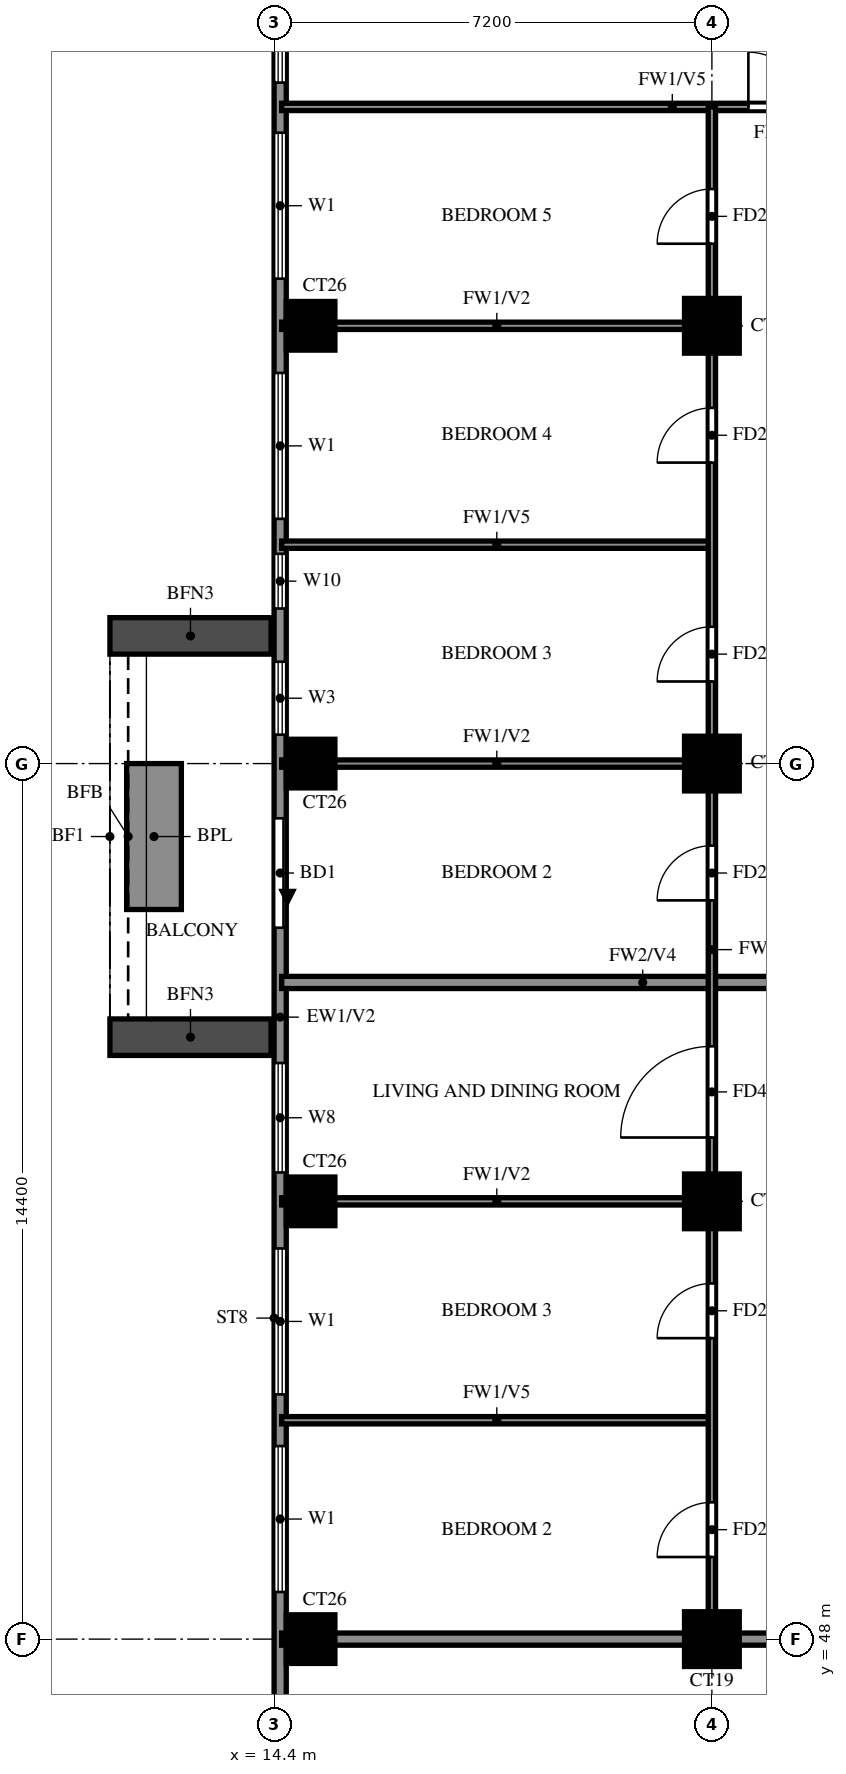
"""IFC4 building model, lengths in metres.
Left out: names, types, materials, properties, quantities, classifications, styles, units other than length and angle.
Written with IfcOpenShell. Run it as: python <this file> out.ifc"""

import sys

from ifc_helpers import new_model, si_unit, direction, frame, frame_2d, origin, origin_2d, place, context, subcontext, project, spatial, rectangle, extrude, source, transform, mapped, element, fill, save


model = new_model("IFC4")
c1 = context("Model", 3, precision=1e-05, world=origin(), true_north=direction((0.0, 1.0)))
c2 = subcontext(c1, "Body", "Model", "MODEL_VIEW")
j1 = project(units=[si_unit("LENGTHUNIT", "METRE"), si_unit("PLANEANGLEUNIT", "RADIAN")], contexts=[c1])
p1 = place(None, origin())
s1 = spatial("IfcSite", under=j1, at=p1, CompositionType="ELEMENT")
p2 = place(p1, origin())
s2 = spatial("IfcBuilding", under=s1, at=p2, CompositionType="ELEMENT")
p3 = place(p2, frame((0.0, 0.0, 188.5)))
s3 = spatial("IfcBuildingStorey", under=s2, at=p3, CompositionType="ELEMENT", Elevation=188.5)
m1 = source(origin(), c2, "Body", "SweptSolid", [
    extrude(rectangle(XDim=0.8, YDim=0.8, at=origin_2d()), origin(), (0.0, 0.0, 1.0), 3.2),
])
p4 = place(p3, frame((15.0, 48.0, 0.0), z_axis=(0.0, 0.0, 1.0), x_axis=(1.0, 0.0, 0.0)))
e1 = element("IfcColumn", 1, at=p4, inside=s3, PredefinedType="COLUMN", context=c2, shape_type="MappedRepresentation", body=[
    mapped(m1, transform((0.0, 0.0, 0.0))),
])
m2 = source(origin(), c2, "Body", "SweptSolid", [
    extrude(rectangle(XDim=0.9, YDim=0.9, at=origin_2d()), origin(), (0.0, 0.0, 1.0), 3.2),
])
p5 = place(p3, frame((21.6, 48.0, 0.0), z_axis=(0.0, 0.0, 1.0), x_axis=(1.0, 0.0, 0.0)))
e2 = element("IfcColumn", 2, at=p5, inside=s3, PredefinedType="COLUMN", context=c2, shape_type="MappedRepresentation", body=[
    mapped(m2, transform((0.0, 0.0, 0.0))),
])
p6 = place(p3, frame((15.0, 55.2, 0.0), z_axis=(0.0, 0.0, 1.0), x_axis=(1.0, 0.0, 0.0)))
e3 = element("IfcColumn", 3, at=p6, inside=s3, PredefinedType="COLUMN", context=c2, shape_type="MappedRepresentation", body=[
    mapped(m1, transform((0.0, 0.0, 0.0))),
])
p7 = place(p3, frame((21.6, 55.2, 0.0), z_axis=(0.0, 0.0, 1.0), x_axis=(1.0, 0.0, 0.0)))
e4 = element("IfcColumn", 4, at=p7, inside=s3, PredefinedType="COLUMN", context=c2, shape_type="MappedRepresentation", body=[
    mapped(m2, transform((0.0, 0.0, 0.0))),
])
p8 = place(p3, frame((15.0, 62.4, 0.0), z_axis=(0.0, 0.0, 1.0), x_axis=(1.0, 0.0, 0.0)))
e5 = element("IfcColumn", 5, at=p8, inside=s3, PredefinedType="COLUMN", context=c2, shape_type="MappedRepresentation", body=[
    mapped(m1, transform((0.0, 0.0, 0.0))),
])
p9 = place(p3, frame((21.6, 62.4, 0.0), z_axis=(0.0, 0.0, 1.0), x_axis=(1.0, 0.0, 0.0)))
e6 = element("IfcColumn", 6, at=p9, inside=s3, PredefinedType="COLUMN", context=c2, shape_type="MappedRepresentation", body=[
    mapped(m2, transform((0.0, 0.0, 0.0))),
])
p10 = place(p3, frame((15.0, 69.6, 0.0), z_axis=(0.0, 0.0, 1.0), x_axis=(1.0, 0.0, 0.0)))
e7 = element("IfcColumn", 7, at=p10, inside=s3, PredefinedType="COLUMN", context=c2, shape_type="MappedRepresentation", body=[
    mapped(m1, transform((0.0, 0.0, 0.0))),
])
p11 = place(p3, frame((21.6, 69.6, 0.0), z_axis=(0.0, 0.0, 1.0), x_axis=(1.0, 0.0, 0.0)))
e8 = element("IfcColumn", 8, at=p11, inside=s3, PredefinedType="COLUMN", context=c2, shape_type="MappedRepresentation", body=[
    mapped(m2, transform((0.0, 0.0, 0.0))),
])
p12 = place(p3, frame((14.5, 76.6, 0.0), z_axis=(0.0, 0.0, 1.0), x_axis=(0.0, -1.0, 0.0)))
e9 = element("IfcWall", 9, at=p12, inside=s3, PredefinedType="SOLIDWALL", context=c2, shape_type="SweptSolid", body=[
    extrude(rectangle(XDim=33.4, YDim=0.2, at=frame_2d((16.7, 0.0))), origin(), (0.0, 0.0, 1.0), 3.2),
])
p13 = place(p12, frame((15.1, 0.0, 0.0)))
e10 = element("IfcOpeningElement", 10, at=p13, cuts=e9, PredefinedType="OPENING", context=c2, shape_type="SweptSolid", body=[
    extrude(rectangle(XDim=1.8, YDim=2.4, at=frame_2d((0.9, 1.2))), frame((0.0, 0.11, 0.0), z_axis=(0.0, -1.0, 0.0), x_axis=(1.0, 0.0, 0.0)), (0.0, 0.0, 1.0), 0.22),
])
p14 = place(p12, frame((29.875, 0.0, 0.6)))
e11 = element("IfcOpeningElement", 11, at=p14, cuts=e9, PredefinedType="OPENING", context=c2, shape_type="SweptSolid", body=[
    extrude(rectangle(XDim=2.4, YDim=2.4, at=frame_2d((1.2, 1.2))), frame((0.0, 0.11, 0.0), z_axis=(0.0, -1.0, 0.0), x_axis=(1.0, 0.0, 0.0)), (0.0, 0.0, 1.0), 0.22),
])
p15 = place(p12, frame((25.425, 0.0, 0.6)))
e12 = element("IfcOpeningElement", 12, at=p15, cuts=e9, PredefinedType="OPENING", context=c2, shape_type="SweptSolid", body=[
    extrude(rectangle(XDim=2.4, YDim=2.4, at=frame_2d((1.2, 1.2))), frame((0.0, 0.11, 0.0), z_axis=(0.0, -1.0, 0.0), x_axis=(1.0, 0.0, 0.0)), (0.0, 0.0, 1.0), 0.22),
])
p16 = place(p12, frame((22.175, 0.0, 0.6)))
e13 = element("IfcOpeningElement", 13, at=p16, cuts=e9, PredefinedType="OPENING", context=c2, shape_type="SweptSolid", body=[
    extrude(rectangle(XDim=2.4, YDim=2.4, at=frame_2d((1.2, 1.2))), frame((0.0, 0.11, 0.0), z_axis=(0.0, -1.0, 0.0), x_axis=(1.0, 0.0, 0.0)), (0.0, 0.0, 1.0), 0.22),
])
p17 = place(p12, frame((19.125, 0.0, 0.6)))
e14 = element("IfcOpeningElement", 14, at=p17, cuts=e9, PredefinedType="OPENING", context=c2, shape_type="SweptSolid", body=[
    extrude(rectangle(XDim=1.8, YDim=2.4, at=frame_2d((0.9, 1.2))), frame((0.0, 0.11, 0.0), z_axis=(0.0, -1.0, 0.0), x_axis=(1.0, 0.0, 0.0)), (0.0, 0.0, 1.0), 0.22),
])
p18 = place(p12, frame((10.75, 0.0, 0.6)))
e15 = element("IfcOpeningElement", 15, at=p18, cuts=e9, PredefinedType="OPENING", context=c2, shape_type="SweptSolid", body=[
    extrude(rectangle(XDim=0.9, YDim=2.4, at=frame_2d((0.45, 1.2))), frame((0.0, 0.11, 0.0), z_axis=(0.0, -1.0, 0.0), x_axis=(1.0, 0.0, 0.0)), (0.0, 0.0, 1.0), 0.22),
])
p19 = place(p12, frame((12.525, 0.0, 0.6)))
e16 = element("IfcOpeningElement", 16, at=p19, cuts=e9, PredefinedType="OPENING", context=c2, shape_type="SweptSolid", body=[
    extrude(rectangle(XDim=1.2, YDim=2.4, at=frame_2d((0.6, 1.2))), frame((0.0, 0.11, 0.0), z_axis=(0.0, -1.0, 0.0), x_axis=(1.0, 0.0, 0.0)), (0.0, 0.0, 1.0), 0.22),
])
p20 = place(p12, frame((7.775, 0.0, 0.6)))
e17 = element("IfcOpeningElement", 17, at=p20, cuts=e9, PredefinedType="OPENING", context=c2, shape_type="SweptSolid", body=[
    extrude(rectangle(XDim=2.4, YDim=2.4, at=frame_2d((1.2, 1.2))), frame((0.0, 0.11, 0.0), z_axis=(0.0, -1.0, 0.0), x_axis=(1.0, 0.0, 0.0)), (0.0, 0.0, 1.0), 0.22),
])
p21 = place(p12, frame((3.825, 0.0, 0.6)))
e18 = element("IfcOpeningElement", 18, at=p21, cuts=e9, PredefinedType="OPENING", context=c2, shape_type="SweptSolid", body=[
    extrude(rectangle(XDim=2.4, YDim=2.4, at=frame_2d((1.2, 1.2))), frame((0.0, 0.11, 0.0), z_axis=(0.0, -1.0, 0.0), x_axis=(1.0, 0.0, 0.0)), (0.0, 0.0, 1.0), 0.22),
])
p22 = place(p12, frame((0.6, 0.0, 0.6)))
e19 = element("IfcOpeningElement", 19, at=p22, cuts=e9, PredefinedType="OPENING", context=c2, shape_type="SweptSolid", body=[
    extrude(rectangle(XDim=2.4, YDim=2.4, at=frame_2d((1.2, 1.2))), frame((0.0, 0.11, 0.0), z_axis=(0.0, -1.0, 0.0), x_axis=(1.0, 0.0, 0.0)), (0.0, 0.0, 1.0), 0.22),
])
for number, where, z_axis, x_axis in (
    (20, (14.35, 64.5, 0.0), (0.0, 0.0, 1.0), (-1.0, 0.0, 0.0)),
    (21, (14.35, 57.9, 0.0), (0.0, 0.0, 1.0), (-1.0, 0.0, 0.0)),
):
    element("IfcWall", number, at=place(p3, frame(where, z_axis=z_axis, x_axis=x_axis)), inside=s3, PredefinedType="SOLIDWALL", context=c2, shape_type="SweptSolid", body=[
        extrude(rectangle(XDim=2.65, YDim=0.6, at=frame_2d((1.325, 0.0))), origin(), (0.0, 0.0, 1.0), 2.85),
    ])
p23 = place(p3, frame((12.425, 62.4, 0.0), z_axis=(0.0, 0.0, 1.0), x_axis=(0.0, -1.0, 0.0)))
e22 = element("IfcWall", 22, at=p23, inside=s3, PredefinedType="SOLIDWALL", context=c2, shape_type="SweptSolid", body=[
    extrude(rectangle(XDim=2.4, YDim=0.9, at=frame_2d((1.2, 0.0))), origin(), (0.0, 0.0, 1.0), 0.9),
])
p24 = place(p3, frame((14.525, 48.0, 0.0), z_axis=(0.0, 0.0, 1.0), x_axis=(1.0, 0.0, 0.0)))
e23 = element("IfcWall", 23, at=p24, inside=s3, PredefinedType="SOLIDWALL", context=c2, shape_type="SweptSolid", body=[
    extrude(rectangle(XDim=19.075, YDim=0.2, at=frame_2d((9.538, 0.0))), origin(), (0.0, 0.0, 1.0), 3.2),
])
p25 = place(p3, frame((14.525, 58.8, 0.0), z_axis=(0.0, 0.0, 1.0), x_axis=(1.0, 0.0, 0.0)))
e24 = element("IfcWall", 24, at=p25, inside=s3, PredefinedType="SOLIDWALL", context=c2, shape_type="SweptSolid", body=[
    extrude(rectangle(XDim=11.875, YDim=0.2, at=frame_2d((5.938, 0.0))), origin(), (0.0, 0.0, 1.0), 2.3),
])
p26 = place(p3, frame((14.525, 51.6, 0.0), z_axis=(0.0, 0.0, 1.0), x_axis=(1.0, 0.0, 0.0)))
e25 = element("IfcWall", 25, at=p26, inside=s3, PredefinedType="PARTITIONING", context=c2, shape_type="SweptSolid", body=[
    extrude(rectangle(XDim=7.075, YDim=0.12, at=frame_2d((3.538, 0.0))), origin(), (0.0, 0.0, 1.0), 2.3),
])
for number, where, z_axis, x_axis in (
    (26, (14.525, 55.2, 0.0), (0.0, 0.0, 1.0), (1.0, 0.0, 0.0)),
    (27, (14.525, 62.4, 0.0), (0.0, 0.0, 1.0), (1.0, 0.0, 0.0)),
):
    element("IfcWall", number, at=place(p3, frame(where, z_axis=z_axis, x_axis=x_axis)), inside=s3, PredefinedType="PARTITIONING", context=c2, shape_type="SweptSolid", body=[
        extrude(rectangle(XDim=7.075, YDim=0.12, at=frame_2d((3.538, 0.0))), origin(), (0.0, 0.0, 1.0), 3.2),
    ])
p27 = place(p3, frame((14.525, 66.0, 0.0), z_axis=(0.0, 0.0, 1.0), x_axis=(1.0, 0.0, 0.0)))
e28 = element("IfcWall", 28, at=p27, inside=s3, PredefinedType="PARTITIONING", context=c2, shape_type="SweptSolid", body=[
    extrude(rectangle(XDim=7.075, YDim=0.12, at=frame_2d((3.538, 0.0))), origin(), (0.0, 0.0, 1.0), 2.3),
])
p28 = place(p3, frame((14.525, 69.6, 0.0), z_axis=(0.0, 0.0, 1.0), x_axis=(1.0, 0.0, 0.0)))
e29 = element("IfcWall", 29, at=p28, inside=s3, PredefinedType="PARTITIONING", context=c2, shape_type="SweptSolid", body=[
    extrude(rectangle(XDim=7.075, YDim=0.12, at=frame_2d((3.538, 0.0))), origin(), (0.0, 0.0, 1.0), 3.2),
])
p29 = place(p3, frame((14.525, 73.2, 0.0), z_axis=(0.0, 0.0, 1.0), x_axis=(1.0, 0.0, 0.0)))
e30 = element("IfcWall", 30, at=p29, inside=s3, PredefinedType="PARTITIONING", context=c2, shape_type="SweptSolid", body=[
    extrude(rectangle(XDim=14.275, YDim=0.12, at=frame_2d((7.138, 0.0))), origin(), (0.0, 0.0, 1.0), 2.3),
])
p30 = place(p29, frame((7.675, 0.0, 0.0)))
e31 = element("IfcOpeningElement", 31, at=p30, cuts=e30, PredefinedType="OPENING", context=c2, shape_type="SweptSolid", body=[
    extrude(rectangle(XDim=0.9, YDim=2.1, at=frame_2d((0.45, 1.05))), frame((0.0, 0.07, 0.0), z_axis=(0.0, -1.0, 0.0), x_axis=(1.0, 0.0, 0.0)), (0.0, 0.0, 1.0), 0.14),
])
p31 = place(p3, frame((21.6, 48.0, 0.0), z_axis=(0.0, 0.0, 1.0), x_axis=(0.0, 1.0, 0.0)))
e32 = element("IfcWall", 32, at=p31, inside=s3, PredefinedType="PARTITIONING", context=c2, shape_type="SweptSolid", body=[
    extrude(rectangle(XDim=25.2, YDim=0.12, at=frame_2d((12.6, 0.0))), origin(), (0.0, 0.0, 1.0), 3.2),
])
p32 = place(p31, frame((1.35, 0.0, 0.0)))
e33 = element("IfcOpeningElement", 33, at=p32, cuts=e32, PredefinedType="OPENING", context=c2, shape_type="SweptSolid", body=[
    extrude(rectangle(XDim=0.9, YDim=2.1, at=frame_2d((0.45, 1.05))), frame((0.0, 0.07, 0.0), z_axis=(0.0, -1.0, 0.0), x_axis=(1.0, 0.0, 0.0)), (0.0, 0.0, 1.0), 0.14),
])
p33 = place(p31, frame((4.95, 0.0, 0.0)))
e34 = element("IfcOpeningElement", 34, at=p33, cuts=e32, PredefinedType="OPENING", context=c2, shape_type="SweptSolid", body=[
    extrude(rectangle(XDim=0.9, YDim=2.1, at=frame_2d((0.45, 1.05))), frame((0.0, 0.07, 0.0), z_axis=(0.0, -1.0, 0.0), x_axis=(1.0, 0.0, 0.0)), (0.0, 0.0, 1.0), 0.14),
])
p34 = place(p31, frame((8.25, 0.0, 0.0)))
e35 = element("IfcOpeningElement", 35, at=p34, cuts=e32, PredefinedType="OPENING", context=c2, shape_type="SweptSolid", body=[
    extrude(rectangle(XDim=1.5, YDim=2.1, at=frame_2d((0.75, 1.05))), frame((0.0, 0.07, 0.0), z_axis=(0.0, -1.0, 0.0), x_axis=(1.0, 0.0, 0.0)), (0.0, 0.0, 1.0), 0.14),
])
p35 = place(p31, frame((12.15, 0.0, 0.0)))
e36 = element("IfcOpeningElement", 36, at=p35, cuts=e32, PredefinedType="OPENING", context=c2, shape_type="SweptSolid", body=[
    extrude(rectangle(XDim=0.9, YDim=2.1, at=frame_2d((0.45, 1.05))), frame((0.0, 0.07, 0.0), z_axis=(0.0, -1.0, 0.0), x_axis=(1.0, 0.0, 0.0)), (0.0, 0.0, 1.0), 0.14),
])
p36 = place(p31, frame((15.75, 0.0, 0.0)))
e37 = element("IfcOpeningElement", 37, at=p36, cuts=e32, PredefinedType="OPENING", context=c2, shape_type="SweptSolid", body=[
    extrude(rectangle(XDim=0.9, YDim=2.1, at=frame_2d((0.45, 1.05))), frame((0.0, 0.07, 0.0), z_axis=(0.0, -1.0, 0.0), x_axis=(1.0, 0.0, 0.0)), (0.0, 0.0, 1.0), 0.14),
])
p37 = place(p31, frame((19.35, 0.0, 0.0)))
e38 = element("IfcOpeningElement", 38, at=p37, cuts=e32, PredefinedType="OPENING", context=c2, shape_type="SweptSolid", body=[
    extrude(rectangle(XDim=0.9, YDim=2.1, at=frame_2d((0.45, 1.05))), frame((0.0, 0.07, 0.0), z_axis=(0.0, -1.0, 0.0), x_axis=(1.0, 0.0, 0.0)), (0.0, 0.0, 1.0), 0.14),
])
p38 = place(p31, frame((22.95, 0.0, 0.0)))
e39 = element("IfcOpeningElement", 39, at=p38, cuts=e32, PredefinedType="OPENING", context=c2, shape_type="SweptSolid", body=[
    extrude(rectangle(XDim=0.9, YDim=2.1, at=frame_2d((0.45, 1.05))), frame((0.0, 0.07, 0.0), z_axis=(0.0, -1.0, 0.0), x_axis=(1.0, 0.0, 0.0)), (0.0, 0.0, 1.0), 0.14),
])
p39 = place(p13, origin())
e40 = element("IfcDoor", 40, at=p39, inside=s3, OperationType="DOUBLE_DOOR_SLIDING", PredefinedType="DOOR", context=c2, shape_type="SweptSolid", body=[
    extrude(rectangle(XDim=1.8, YDim=2.4, at=frame_2d((0.9, 1.2))), frame((0.0, 0.025, 0.0), z_axis=(0.0, -1.0, 0.0), x_axis=(1.0, 0.0, 0.0)), (0.0, 0.0, 1.0), 0.05),
])
fill(e10, e40)
p40 = place(p15, origin())
e41 = element("IfcWindow", 41, at=p40, inside=s3, PartitioningType="DOUBLE_PANEL_VERTICAL", PredefinedType="WINDOW", context=c2, shape_type="SweptSolid", body=[
    extrude(rectangle(XDim=2.4, YDim=2.4, at=frame_2d((1.2, 1.2))), frame((0.0, 0.03, 0.0), z_axis=(0.0, -1.0, 0.0), x_axis=(1.0, 0.0, 0.0)), (0.0, 0.0, 1.0), 0.06),
])
fill(e12, e41)
p41 = place(p16, origin())
e42 = element("IfcWindow", 42, at=p41, inside=s3, PartitioningType="DOUBLE_PANEL_VERTICAL", PredefinedType="WINDOW", context=c2, shape_type="SweptSolid", body=[
    extrude(rectangle(XDim=2.4, YDim=2.4, at=frame_2d((1.2, 1.2))), frame((0.0, 0.03, 0.0), z_axis=(0.0, -1.0, 0.0), x_axis=(1.0, 0.0, 0.0)), (0.0, 0.0, 1.0), 0.06),
])
fill(e13, e42)
p42 = place(p17, origin())
e43 = element("IfcWindow", 43, at=p42, inside=s3, PartitioningType="DOUBLE_PANEL_VERTICAL", PredefinedType="WINDOW", context=c2, shape_type="SweptSolid", body=[
    extrude(rectangle(XDim=1.8, YDim=2.4, at=frame_2d((0.9, 1.2))), frame((0.0, 0.03, 0.0), z_axis=(0.0, -1.0, 0.0), x_axis=(1.0, 0.0, 0.0)), (0.0, 0.0, 1.0), 0.06),
])
fill(e14, e43)
p43 = place(p18, origin())
e44 = element("IfcWindow", 44, at=p43, inside=s3, PartitioningType="SINGLE_PANEL", PredefinedType="WINDOW", context=c2, shape_type="SweptSolid", body=[
    extrude(rectangle(XDim=0.9, YDim=2.4, at=frame_2d((0.45, 1.2))), frame((0.0, 0.03, 0.0), z_axis=(0.0, -1.0, 0.0), x_axis=(1.0, 0.0, 0.0)), (0.0, 0.0, 1.0), 0.06),
])
fill(e15, e44)
p44 = place(p19, origin())
e45 = element("IfcWindow", 45, at=p44, inside=s3, PartitioningType="SINGLE_PANEL", PredefinedType="WINDOW", context=c2, shape_type="SweptSolid", body=[
    extrude(rectangle(XDim=1.2, YDim=2.4, at=frame_2d((0.6, 1.2))), frame((0.0, 0.03, 0.0), z_axis=(0.0, -1.0, 0.0), x_axis=(1.0, 0.0, 0.0)), (0.0, 0.0, 1.0), 0.06),
])
fill(e16, e45)
p45 = place(p20, origin())
e46 = element("IfcWindow", 46, at=p45, inside=s3, PartitioningType="DOUBLE_PANEL_VERTICAL", PredefinedType="WINDOW", context=c2, shape_type="SweptSolid", body=[
    extrude(rectangle(XDim=2.4, YDim=2.4, at=frame_2d((1.2, 1.2))), frame((0.0, 0.03, 0.0), z_axis=(0.0, -1.0, 0.0), x_axis=(1.0, 0.0, 0.0)), (0.0, 0.0, 1.0), 0.06),
])
fill(e17, e46)
p46 = place(p21, origin())
e47 = element("IfcWindow", 47, at=p46, inside=s3, PartitioningType="DOUBLE_PANEL_VERTICAL", PredefinedType="WINDOW", context=c2, shape_type="SweptSolid", body=[
    extrude(rectangle(XDim=2.4, YDim=2.4, at=frame_2d((1.2, 1.2))), frame((0.0, 0.03, 0.0), z_axis=(0.0, -1.0, 0.0), x_axis=(1.0, 0.0, 0.0)), (0.0, 0.0, 1.0), 0.06),
])
fill(e18, e47)
p47 = place(p22, origin())
e48 = element("IfcWindow", 48, at=p47, inside=s3, PartitioningType="DOUBLE_PANEL_VERTICAL", PredefinedType="WINDOW", context=c2, shape_type="SweptSolid", body=[
    extrude(rectangle(XDim=2.4, YDim=2.4, at=frame_2d((1.2, 1.2))), frame((0.0, 0.03, 0.0), z_axis=(0.0, -1.0, 0.0), x_axis=(1.0, 0.0, 0.0)), (0.0, 0.0, 1.0), 0.06),
])
fill(e19, e48)
p48 = place(p32, origin())
e49 = element("IfcDoor", 49, at=p48, inside=s3, OperationType="SINGLE_SWING_LEFT", PredefinedType="DOOR", context=c2, shape_type="SweptSolid", body=[
    extrude(rectangle(XDim=0.9, YDim=2.1, at=frame_2d((0.45, 1.05))), frame((0.0, 0.025, 0.0), z_axis=(0.0, -1.0, 0.0), x_axis=(1.0, 0.0, 0.0)), (0.0, 0.0, 1.0), 0.05),
])
fill(e33, e49)
p49 = place(p33, origin())
e50 = element("IfcDoor", 50, at=p49, inside=s3, OperationType="SINGLE_SWING_LEFT", PredefinedType="DOOR", context=c2, shape_type="SweptSolid", body=[
    extrude(rectangle(XDim=0.9, YDim=2.1, at=frame_2d((0.45, 1.05))), frame((0.0, 0.025, 0.0), z_axis=(0.0, -1.0, 0.0), x_axis=(1.0, 0.0, 0.0)), (0.0, 0.0, 1.0), 0.05),
])
fill(e34, e50)
p50 = place(p34, origin())
e51 = element("IfcDoor", 51, at=p50, inside=s3, OperationType="SINGLE_SWING_RIGHT", PredefinedType="DOOR", context=c2, shape_type="SweptSolid", body=[
    extrude(rectangle(XDim=1.5, YDim=2.1, at=frame_2d((0.75, 1.05))), frame((0.0, 0.025, 0.0), z_axis=(0.0, -1.0, 0.0), x_axis=(1.0, 0.0, 0.0)), (0.0, 0.0, 1.0), 0.05),
])
fill(e35, e51)
p51 = place(p35, origin())
e52 = element("IfcDoor", 52, at=p51, inside=s3, OperationType="SINGLE_SWING_RIGHT", PredefinedType="DOOR", context=c2, shape_type="SweptSolid", body=[
    extrude(rectangle(XDim=0.9, YDim=2.1, at=frame_2d((0.45, 1.05))), frame((0.0, 0.025, 0.0), z_axis=(0.0, -1.0, 0.0), x_axis=(1.0, 0.0, 0.0)), (0.0, 0.0, 1.0), 0.05),
])
fill(e36, e52)
p52 = place(p36, origin())
e53 = element("IfcDoor", 53, at=p52, inside=s3, OperationType="SINGLE_SWING_LEFT", PredefinedType="DOOR", context=c2, shape_type="SweptSolid", body=[
    extrude(rectangle(XDim=0.9, YDim=2.1, at=frame_2d((0.45, 1.05))), frame((0.0, 0.025, 0.0), z_axis=(0.0, -1.0, 0.0), x_axis=(1.0, 0.0, 0.0)), (0.0, 0.0, 1.0), 0.05),
])
fill(e37, e53)
p53 = place(p37, origin())
e54 = element("IfcDoor", 54, at=p53, inside=s3, OperationType="SINGLE_SWING_LEFT", PredefinedType="DOOR", context=c2, shape_type="SweptSolid", body=[
    extrude(rectangle(XDim=0.9, YDim=2.1, at=frame_2d((0.45, 1.05))), frame((0.0, 0.025, 0.0), z_axis=(0.0, -1.0, 0.0), x_axis=(1.0, 0.0, 0.0)), (0.0, 0.0, 1.0), 0.05),
])
fill(e38, e54)
p54 = place(p38, origin())
e55 = element("IfcDoor", 55, at=p54, inside=s3, OperationType="SINGLE_SWING_RIGHT", PredefinedType="DOOR", context=c2, shape_type="SweptSolid", body=[
    extrude(rectangle(XDim=0.9, YDim=2.1, at=frame_2d((0.45, 1.05))), frame((0.0, 0.025, 0.0), z_axis=(0.0, -1.0, 0.0), x_axis=(1.0, 0.0, 0.0)), (0.0, 0.0, 1.0), 0.05),
])
fill(e39, e55)
p55 = place(p30, origin())
e56 = element("IfcDoor", 56, at=p55, inside=s3, OperationType="SINGLE_SWING_LEFT", PredefinedType="DOOR", context=c2, shape_type="SweptSolid", body=[
    extrude(rectangle(XDim=0.9, YDim=2.1, at=frame_2d((0.45, 1.05))), frame((0.0, 0.025, 0.0), z_axis=(0.0, -1.0, 0.0), x_axis=(1.0, 0.0, 0.0)), (0.0, 0.0, 1.0), 0.05),
])
fill(e31, e56)
save(model, sys.argv[1])
